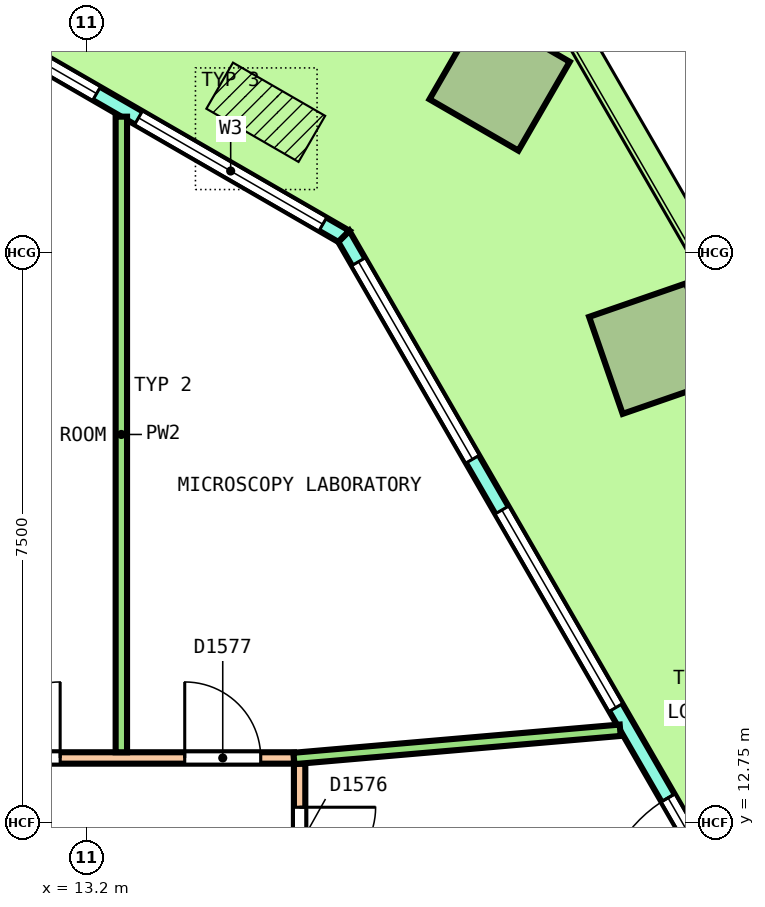
"""IFC4 building model, lengths in metres.
Left out: names, types, materials, properties, quantities, classifications, styles, units other than length and angle.
Written with IfcOpenShell. Run it as: python <this file> out.ifc"""

import sys

from ifc_helpers import new_model, si_unit, direction, frame, frame_2d, origin, origin_2d, place, context, subcontext, project, spatial, polyline, rectangle, outline, extrude, element, fill, save


model = new_model("IFC4")
c1 = context("Model", 3, precision=1e-05, world=origin(), true_north=direction((0.0, 1.0)))
c2 = subcontext(c1, "Body", "Model", "MODEL_VIEW")
j1 = project(units=[si_unit("LENGTHUNIT", "METRE"), si_unit("PLANEANGLEUNIT", "RADIAN")], contexts=[c1])
p1 = place(None, origin())
s1 = spatial("IfcSite", under=j1, at=p1, CompositionType="ELEMENT")
p2 = place(p1, origin())
s2 = spatial("IfcBuilding", under=s1, at=p2, CompositionType="ELEMENT")
p3 = place(p2, frame((0.0, 0.0, 102.8)))
s3 = spatial("IfcBuildingStorey", under=s2, at=p3, CompositionType="ELEMENT", Elevation=102.8)
p4 = place(p3, frame((20.667, 18.986, 0.0), z_axis=(0.032654174822, 0.006325993277, 0.999446690262), x_axis=(-0.500478631698, 0.865680616164, 0.010872442804)))
e1 = element("IfcColumn", 1, at=p4, inside=s3, PredefinedType="COLUMN", context=c2, shape_type="SweptSolid", body=[
    extrude(rectangle(XDim=1.35, YDim=1.35, at=origin_2d()), origin(), (0.0, 0.0, 1.0), 4.052),
])
p5 = place(p3, frame((18.631, 22.512, 0.0), z_axis=(0.036265236264, 0.0, 0.999342199969), x_axis=(-0.865313546461, 0.500246354177, 0.031401456084)))
e2 = element("IfcColumn", 2, at=p5, inside=s3, PredefinedType="COLUMN", context=c2, shape_type="SweptSolid", body=[
    extrude(rectangle(XDim=1.35, YDim=1.35, at=origin_2d()), origin(), (0.0, 0.0, 1.0), 4.053),
])
p6 = place(p3, frame((26.012, 4.129, 0.0), z_axis=(0.0, 0.0, 1.0), x_axis=(-0.499999588275, 0.866025641494, 0.0)))
e3 = element("IfcWall", 3, at=p6, inside=s3, PredefinedType="SOLIDWALL", context=c2, shape_type="SweptSolid", body=[
    extrude(outline(polyline([(-0.027, -0.1), (1.024, -0.1), (2.075, -0.1), (3.125, -0.1), (4.176, -0.1), (5.227, -0.1), (6.278, -0.1), (7.329, -0.1), (8.38, -0.1), (9.43, -0.1), (10.481, -0.1), (11.532, -0.1), (12.583, -0.1), (13.634, -0.1), (14.685, -0.1), (15.735, -0.1), (16.786, -0.1), (17.837, -0.1), (18.888, -0.1), (18.834, 0.1), (17.789, 0.1), (16.744, 0.1), (15.699, 0.1), (14.655, 0.1), (13.61, 0.1), (12.565, 0.1), (11.52, 0.1), (10.475, 0.1), (9.43, 0.1), (8.385, 0.1), (7.341, 0.1), (6.296, 0.1), (5.251, 0.1), (4.206, 0.1), (3.161, 0.1), (2.116, 0.1), (1.072, 0.1), (0.027, 0.1), (-0.027, -0.1)])), origin(), (0.0, 0.0, 1.0), 4.1),
])
p7 = place(p6, frame((0.386, 0.0, 0.1)))
e4 = element("IfcOpeningElement", 4, at=p7, cuts=e3, PredefinedType="OPENING", context=c2, shape_type="SweptSolid", body=[
    extrude(rectangle(XDim=3.0, YDim=2.9, at=frame_2d((1.5, 1.45))), frame((0.0, 0.11, 0.0), z_axis=(0.0, -1.0, 0.0), x_axis=(1.0, 0.0, 0.0)), (0.0, 0.0, 1.0), 0.22),
])
p8 = place(p6, frame((4.158, 0.0, 0.1)))
e5 = element("IfcOpeningElement", 5, at=p8, cuts=e3, PredefinedType="OPENING", context=c2, shape_type="SweptSolid", body=[
    extrude(rectangle(XDim=3.0, YDim=2.9, at=frame_2d((1.5, 1.45))), frame((0.0, 0.11, 0.0), z_axis=(0.0, -1.0, 0.0), x_axis=(1.0, 0.0, 0.0)), (0.0, 0.0, 1.0), 0.22),
])
p9 = place(p6, frame((8.531, 0.0, 0.0)))
e6 = element("IfcOpeningElement", 6, at=p9, cuts=e3, PredefinedType="OPENING", context=c2, shape_type="SweptSolid", body=[
    extrude(rectangle(XDim=1.8, YDim=2.4, at=frame_2d((0.9, 1.2))), frame((0.0, 0.11, 0.0), z_axis=(0.0, -1.0, 0.0), x_axis=(1.0, 0.0, 0.0)), (0.0, 0.0, 1.0), 0.22),
])
p10 = place(p6, frame((8.531, 0.0, 2.55)))
e7 = element("IfcOpeningElement", 7, at=p10, cuts=e3, PredefinedType="OPENING", context=c2, shape_type="SweptSolid", body=[
    extrude(rectangle(XDim=1.8, YDim=0.45, at=frame_2d((0.9, 0.225))), frame((0.0, 0.11, 0.0), z_axis=(0.0, -1.0, 0.0), x_axis=(1.0, 0.0, 0.0)), (0.0, 0.0, 1.0), 0.22),
])
p11 = place(p6, frame((11.703, 0.0, 0.1)))
e8 = element("IfcOpeningElement", 8, at=p11, cuts=e3, PredefinedType="OPENING", context=c2, shape_type="SweptSolid", body=[
    extrude(rectangle(XDim=3.0, YDim=2.9, at=frame_2d((1.5, 1.45))), frame((0.0, 0.11, 0.0), z_axis=(0.0, -1.0, 0.0), x_axis=(1.0, 0.0, 0.0)), (0.0, 0.0, 1.0), 0.22),
])
p12 = place(p6, frame((15.475, 0.0, 0.1)))
e9 = element("IfcOpeningElement", 9, at=p12, cuts=e3, PredefinedType="OPENING", context=c2, shape_type="SweptSolid", body=[
    extrude(rectangle(XDim=3.0, YDim=2.9, at=frame_2d((1.5, 1.45))), frame((0.0, 0.11, 0.0), z_axis=(0.0, -1.0, 0.0), x_axis=(1.0, 0.0, 0.0)), (0.0, 0.0, 1.0), 0.22),
])
p13 = place(p3, frame((16.582, 20.463, 0.0), z_axis=(0.0, 0.0, 1.0), x_axis=(-0.866029458321, 0.49999297727, 0.0)))
e10 = element("IfcWall", 10, at=p13, inside=s3, PredefinedType="SOLIDWALL", context=c2, shape_type="SweptSolid", body=[
    extrude(outline(polyline([(-0.027, -0.1), (1.128, -0.1), (2.282, -0.1), (3.437, -0.1), (4.592, -0.1), (5.747, -0.1), (6.901, -0.1), (6.848, 0.1), (5.711, 0.1), (4.574, 0.1), (3.437, 0.1), (2.301, 0.1), (1.164, 0.1), (0.027, 0.1), (-0.027, -0.1)])), origin(), (0.0, 0.0, 1.0), 4.1),
])
p14 = place(p13, frame((0.319, 0.0, 0.1)))
e11 = element("IfcOpeningElement", 11, at=p14, cuts=e10, PredefinedType="OPENING", context=c2, shape_type="SweptSolid", body=[
    extrude(rectangle(XDim=2.8, YDim=2.9, at=frame_2d((1.4, 1.45))), frame((0.0, 0.11, 0.0), z_axis=(0.0, -1.0, 0.0), x_axis=(1.0, 0.0, 0.0)), (0.0, 0.0, 1.0), 0.22),
])
p15 = place(p13, frame((3.756, 0.0, 0.1)))
e12 = element("IfcOpeningElement", 12, at=p15, cuts=e10, PredefinedType="OPENING", context=c2, shape_type="SweptSolid", body=[
    extrude(rectangle(XDim=2.8, YDim=2.9, at=frame_2d((1.4, 1.45))), frame((0.0, 0.11, 0.0), z_axis=(0.0, -1.0, 0.0), x_axis=(1.0, 0.0, 0.0)), (0.0, 0.0, 1.0), 0.22),
])
p16 = place(p3, frame((16.0, -13.525, 0.0), z_axis=(0.0, 0.0, 1.0), x_axis=(0.0, 1.0, 0.0)))
e13 = element("IfcWall", 13, at=p16, inside=s3, PredefinedType="PARTITIONING", context=c2, shape_type="SweptSolid", body=[
    extrude(rectangle(XDim=27.05, YDim=0.15, at=frame_2d((13.525, 0.0))), origin(), (0.0, 0.0, 1.0), 3.05),
])
p17 = place(p16, frame((18.625, 0.0, 0.0)))
e14 = element("IfcOpeningElement", 14, at=p17, cuts=e13, PredefinedType="OPENING", context=c2, shape_type="SweptSolid", body=[
    extrude(rectangle(XDim=1.2, YDim=2.1, at=frame_2d((0.6, 1.05))), frame((0.0, 0.085, 0.0), z_axis=(0.0, -1.0, 0.0), x_axis=(1.0, 0.0, 0.0)), (0.0, 0.0, 1.0), 0.17),
])
p18 = place(p16, frame((25.477, 0.0, 0.0)))
e15 = element("IfcOpeningElement", 15, at=p18, cuts=e13, PredefinedType="OPENING", context=c2, shape_type="SweptSolid", body=[
    extrude(rectangle(XDim=1.0, YDim=2.1, at=frame_2d((0.5, 1.05))), frame((0.0, 0.085, 0.0), z_axis=(0.0, -1.0, 0.0), x_axis=(1.0, 0.0, 0.0)), (0.0, 0.0, 1.0), 0.17),
])
p19 = place(p16, frame((1.148, 0.0, 0.0)))
e16 = element("IfcOpeningElement", 16, at=p19, cuts=e13, PredefinedType="OPENING", context=c2, shape_type="SweptSolid", body=[
    extrude(rectangle(XDim=1.0, YDim=2.1, at=frame_2d((0.5, 1.05))), frame((0.0, 0.085, 0.0), z_axis=(0.0, -1.0, 0.0), x_axis=(1.0, 0.0, 0.0)), (0.0, 0.0, 1.0), 0.17),
])
p20 = place(p16, frame((4.417, 0.0, 0.0)))
e17 = element("IfcOpeningElement", 17, at=p20, cuts=e13, PredefinedType="OPENING", context=c2, shape_type="SweptSolid", body=[
    extrude(rectangle(XDim=1.0, YDim=2.1, at=frame_2d((0.5, 1.05))), frame((0.0, 0.085, 0.0), z_axis=(0.0, -1.0, 0.0), x_axis=(1.0, 0.0, 0.0)), (0.0, 0.0, 1.0), 0.17),
])
p21 = place(p16, frame((7.909, 0.0, 0.0)))
e18 = element("IfcOpeningElement", 18, at=p21, cuts=e13, PredefinedType="OPENING", context=c2, shape_type="SweptSolid", body=[
    extrude(rectangle(XDim=1.0, YDim=2.1, at=frame_2d((0.5, 1.05))), frame((0.0, 0.085, 0.0), z_axis=(0.0, -1.0, 0.0), x_axis=(1.0, 0.0, 0.0)), (0.0, 0.0, 1.0), 0.17),
])
p22 = place(p16, frame((11.984, 0.0, 0.0)))
e19 = element("IfcOpeningElement", 19, at=p22, cuts=e13, PredefinedType="OPENING", context=c2, shape_type="SweptSolid", body=[
    extrude(rectangle(XDim=1.0, YDim=2.1, at=frame_2d((0.5, 1.05))), frame((0.0, 0.085, 0.0), z_axis=(0.0, -1.0, 0.0), x_axis=(1.0, 0.0, 0.0)), (0.0, 0.0, 1.0), 0.17),
])
p23 = place(p3, frame((-15.925, 13.6, 0.0), z_axis=(0.0, 0.0, 1.0), x_axis=(1.0, 0.0, 0.0)))
e20 = element("IfcWall", 20, at=p23, inside=s3, PredefinedType="PARTITIONING", context=c2, shape_type="SweptSolid", body=[
    extrude(rectangle(XDim=31.85, YDim=0.15, at=frame_2d((15.925, 0.0))), origin(), (0.0, 0.0, 1.0), 3.05),
])
p24 = place(p23, frame((30.414, 0.0, 0.0)))
e21 = element("IfcOpeningElement", 21, at=p24, cuts=e20, PredefinedType="OPENING", context=c2, shape_type="SweptSolid", body=[
    extrude(rectangle(XDim=1.0, YDim=2.1, at=frame_2d((0.5, 1.05))), frame((0.0, 0.085, 0.0), z_axis=(0.0, -1.0, 0.0), x_axis=(1.0, 0.0, 0.0)), (0.0, 0.0, 1.0), 0.17),
])
p25 = place(p23, frame((27.775, 0.0, 0.0)))
e22 = element("IfcOpeningElement", 22, at=p25, cuts=e20, PredefinedType="OPENING", context=c2, shape_type="SweptSolid", body=[
    extrude(rectangle(XDim=1.0, YDim=2.1, at=frame_2d((0.5, 1.05))), frame((0.0, 0.085, 0.0), z_axis=(0.0, -1.0, 0.0), x_axis=(1.0, 0.0, 0.0)), (0.0, 0.0, 1.0), 0.17),
])
p26 = place(p23, frame((16.865, 0.0, 0.0)))
e23 = element("IfcOpeningElement", 23, at=p26, cuts=e20, PredefinedType="OPENING", context=c2, shape_type="SweptSolid", body=[
    extrude(rectangle(XDim=1.2, YDim=2.1, at=frame_2d((0.6, 1.05))), frame((0.0, 0.085, 0.0), z_axis=(0.0, -1.0, 0.0), x_axis=(1.0, 0.0, 0.0)), (0.0, 0.0, 1.0), 0.17),
])
p27 = place(p23, frame((10.738, 0.0, 0.0)))
e24 = element("IfcOpeningElement", 24, at=p27, cuts=e20, PredefinedType="OPENING", context=c2, shape_type="SweptSolid", body=[
    extrude(rectangle(XDim=1.0, YDim=2.1, at=frame_2d((0.5, 1.05))), frame((0.0, 0.085, 0.0), z_axis=(0.0, -1.0, 0.0), x_axis=(1.0, 0.0, 0.0)), (0.0, 0.0, 1.0), 0.17),
])
p28 = place(p23, frame((3.075, 0.0, 0.0)))
e25 = element("IfcOpeningElement", 25, at=p28, cuts=e20, PredefinedType="OPENING", context=c2, shape_type="SweptSolid", body=[
    extrude(rectangle(XDim=1.0, YDim=2.1, at=frame_2d((0.5, 1.05))), frame((0.0, 0.085, 0.0), z_axis=(0.0, -1.0, 0.0), x_axis=(1.0, 0.0, 0.0)), (0.0, 0.0, 1.0), 0.17),
])
p29 = place(p23, frame((0.759, 0.0, 0.0)))
e26 = element("IfcOpeningElement", 26, at=p29, cuts=e20, PredefinedType="OPENING", context=c2, shape_type="SweptSolid", body=[
    extrude(rectangle(XDim=1.0, YDim=2.1, at=frame_2d((0.5, 1.05))), frame((0.0, 0.085, 0.0), z_axis=(0.0, -1.0, 0.0), x_axis=(1.0, 0.0, 0.0)), (0.0, 0.0, 1.0), 0.17),
])
p30 = place(p3, frame((15.925, 13.594, 0.0), z_axis=(0.0, 0.0, 1.0), x_axis=(0.996283839141, 0.0861307835, 0.0)))
e27 = element("IfcWall", 27, at=p30, inside=s3, PredefinedType="PARTITIONING", context=c2, shape_type="SweptSolid", body=[
    extrude(rectangle(XDim=4.309, YDim=0.15, at=frame_2d((2.154, 0.0))), origin(), (0.0, 0.0, 1.0), 3.05),
])
p31 = place(p3, frame((13.655, 13.675, 0.0), z_axis=(0.0, 0.0, 1.0), x_axis=(0.0, 1.0, 0.0)))
e28 = element("IfcWall", 28, at=p31, inside=s3, PredefinedType="PARTITIONING", context=c2, shape_type="SweptSolid", body=[
    extrude(rectangle(XDim=8.362, YDim=0.15, at=frame_2d((4.181, 0.0))), origin(), (0.0, 0.0, 1.0), 3.05),
])
p32 = place(p9, origin())
e29 = element("IfcDoor", 29, at=p32, inside=s3, OperationType="DOUBLE_DOOR_SINGLE_SWING", PredefinedType="DOOR", context=c2, shape_type="SweptSolid", body=[
    extrude(rectangle(XDim=1.8, YDim=2.4, at=frame_2d((0.9, 1.2))), frame((0.0, 0.025, 0.0), z_axis=(0.0, -1.0, 0.0), x_axis=(1.0, 0.0, 0.0)), (0.0, 0.0, 1.0), 0.05),
])
fill(e6, e29)
p33 = place(p10, origin())
e30 = element("IfcWindow", 30, at=p33, inside=s3, PartitioningType="SINGLE_PANEL", PredefinedType="WINDOW", context=c2, shape_type="SweptSolid", body=[
    extrude(rectangle(XDim=1.8, YDim=0.45, at=frame_2d((0.9, 0.225))), frame((0.0, 0.03, 0.0), z_axis=(0.0, -1.0, 0.0), x_axis=(1.0, 0.0, 0.0)), (0.0, 0.0, 1.0), 0.06),
])
fill(e7, e30)
p34 = place(p11, origin())
e31 = element("IfcWindow", 31, at=p34, inside=s3, PartitioningType="SINGLE_PANEL", PredefinedType="WINDOW", context=c2, shape_type="SweptSolid", body=[
    extrude(rectangle(XDim=3.0, YDim=2.9, at=frame_2d((1.5, 1.45))), frame((0.0, 0.03, 0.0), z_axis=(0.0, -1.0, 0.0), x_axis=(1.0, 0.0, 0.0)), (0.0, 0.0, 1.0), 0.06),
])
fill(e8, e31)
p35 = place(p12, origin())
e32 = element("IfcWindow", 32, at=p35, inside=s3, PartitioningType="SINGLE_PANEL", PredefinedType="WINDOW", context=c2, shape_type="SweptSolid", body=[
    extrude(rectangle(XDim=3.0, YDim=2.9, at=frame_2d((1.5, 1.45))), frame((0.0, 0.03, 0.0), z_axis=(0.0, -1.0, 0.0), x_axis=(1.0, 0.0, 0.0)), (0.0, 0.0, 1.0), 0.06),
])
fill(e9, e32)
p36 = place(p14, origin())
e33 = element("IfcWindow", 33, at=p36, inside=s3, PartitioningType="SINGLE_PANEL", PredefinedType="WINDOW", context=c2, shape_type="SweptSolid", body=[
    extrude(rectangle(XDim=2.8, YDim=2.9, at=frame_2d((1.4, 1.45))), frame((0.0, 0.03, 0.0), z_axis=(0.0, -1.0, 0.0), x_axis=(1.0, 0.0, 0.0)), (0.0, 0.0, 1.0), 0.06),
])
fill(e11, e33)
p37 = place(p15, origin())
e34 = element("IfcWindow", 34, at=p37, inside=s3, PartitioningType="SINGLE_PANEL", PredefinedType="WINDOW", context=c2, shape_type="SweptSolid", body=[
    extrude(rectangle(XDim=2.8, YDim=2.9, at=frame_2d((1.4, 1.45))), frame((0.0, 0.03, 0.0), z_axis=(0.0, -1.0, 0.0), x_axis=(1.0, 0.0, 0.0)), (0.0, 0.0, 1.0), 0.06),
])
fill(e12, e34)
p38 = place(p18, origin())
e35 = element("IfcDoor", 35, at=p38, inside=s3, OperationType="SINGLE_SWING_LEFT", PredefinedType="DOOR", context=c2, shape_type="SweptSolid", body=[
    extrude(rectangle(XDim=1.0, YDim=2.1, at=frame_2d((0.5, 1.05))), frame((0.0, 0.025, 0.0), z_axis=(0.0, -1.0, 0.0), x_axis=(1.0, 0.0, 0.0)), (0.0, 0.0, 1.0), 0.05),
])
fill(e15, e35)
p39 = place(p24, origin())
e36 = element("IfcDoor", 36, at=p39, inside=s3, OperationType="SINGLE_SWING_LEFT", PredefinedType="DOOR", context=c2, shape_type="SweptSolid", body=[
    extrude(rectangle(XDim=1.0, YDim=2.1, at=frame_2d((0.5, 1.05))), frame((0.0, 0.025, 0.0), z_axis=(0.0, -1.0, 0.0), x_axis=(1.0, 0.0, 0.0)), (0.0, 0.0, 1.0), 0.05),
])
fill(e21, e36)
p40 = place(p25, origin())
e37 = element("IfcDoor", 37, at=p40, inside=s3, OperationType="SINGLE_SWING_RIGHT", PredefinedType="DOOR", context=c2, shape_type="SweptSolid", body=[
    extrude(rectangle(XDim=1.0, YDim=2.1, at=frame_2d((0.5, 1.05))), frame((0.0, 0.025, 0.0), z_axis=(0.0, -1.0, 0.0), x_axis=(1.0, 0.0, 0.0)), (0.0, 0.0, 1.0), 0.05),
])
fill(e22, e37)
save(model, sys.argv[1])
